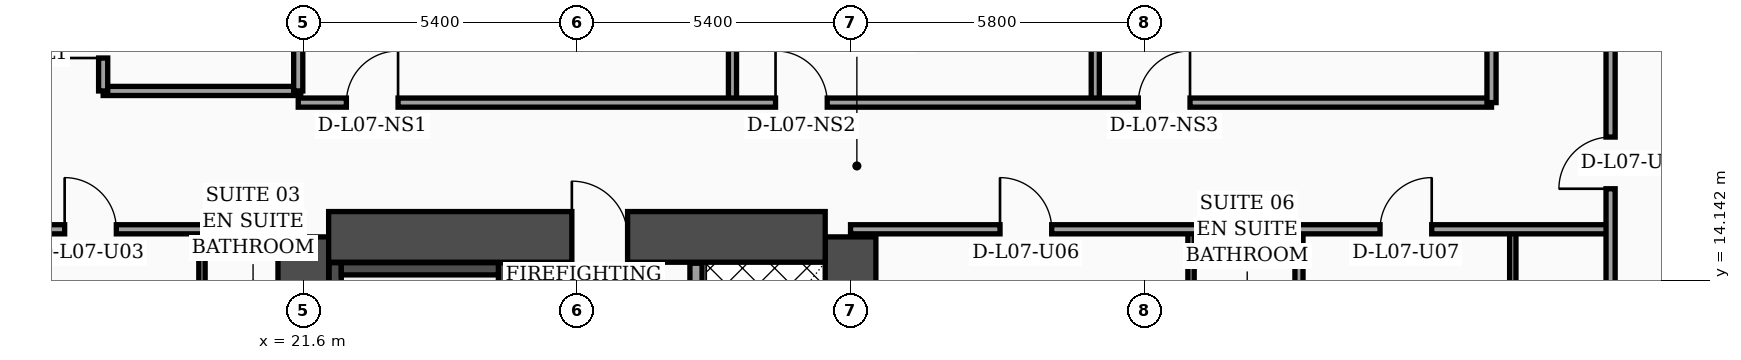
"""IFC4 building model, lengths in metres.
Left out: names, types, materials, properties, quantities, classifications, styles, units other than length and angle.
Written with IfcOpenShell. Run it as: python <this file> out.ifc"""

import sys

from ifc_helpers import new_model, si_unit, direction, frame, frame_2d, origin, place, context, subcontext, project, spatial, rectangle, extrude, element, fill, save


model = new_model("IFC4")
c1 = context("Model", 3, precision=1e-05, world=origin(), true_north=direction((0.0, 1.0)))
c2 = subcontext(c1, "Body", "Model", "MODEL_VIEW")
j1 = project(units=[si_unit("LENGTHUNIT", "METRE"), si_unit("PLANEANGLEUNIT", "RADIAN")], contexts=[c1])
p1 = place(None, origin())
s1 = spatial("IfcSite", under=j1, at=p1, CompositionType="ELEMENT")
p2 = place(p1, origin())
s2 = spatial("IfcBuilding", under=s1, at=p2, CompositionType="ELEMENT")
p3 = place(p2, frame((0.0, 0.0, 34.6)))
s3 = spatial("IfcBuildingStorey", under=s2, at=p3, CompositionType="ELEMENT", Elevation=34.6)
for number, where, z_axis, x_axis in (
    (1, (21.6, 4.6, 0.0), (0.0, 0.0, 1.0), (0.0, 1.0, 0.0)),
    (2, (32.4, 4.6, 0.0), (0.0, 0.0, 1.0), (0.0, 1.0, 0.0)),
):
    element("IfcWall", number, at=place(p3, frame(where, z_axis=z_axis, x_axis=x_axis)), inside=s3, PredefinedType="SHEAR", context=c2, shape_type="SweptSolid", body=[
        extrude(rectangle(XDim=10.4, YDim=1.0, at=frame_2d((5.2, 0.0))), origin(), (0.0, 0.0, 1.0), 3.56),
    ])
p4 = place(p3, frame((22.1, 15.0, 0.0), z_axis=(0.0, 0.0, 1.0), x_axis=(1.0, 0.0, 0.0)))
e3 = element("IfcWall", 3, at=p4, inside=s3, PredefinedType="SHEAR", context=c2, shape_type="SweptSolid", body=[
    extrude(rectangle(XDim=9.8, YDim=1.0, at=frame_2d((4.9, 0.0))), origin(), (0.0, 0.0, 1.0), 3.56),
])
p5 = place(p4, frame((4.8, 0.0, 0.0)))
e4 = element("IfcOpeningElement", 4, at=p5, cuts=e3, PredefinedType="OPENING", context=c2, shape_type="SweptSolid", body=[
    extrude(rectangle(XDim=1.1, YDim=2.2, at=frame_2d((0.55, 1.1))), frame((0.0, 0.51, 0.0), z_axis=(0.0, -1.0, 0.0), x_axis=(1.0, 0.0, 0.0)), (0.0, 0.0, 1.0), 1.02),
])
p6 = place(p3, frame((22.23, 5.1, 0.0), z_axis=(0.0, 0.0, 1.0), x_axis=(0.0, 1.0, 0.0)))
e5 = element("IfcWall", 5, at=p6, inside=s3, PredefinedType="SOLIDWALL", context=c2, shape_type="SweptSolid", body=[
    extrude(rectangle(XDim=9.39, YDim=0.24, at=frame_2d((4.695, 0.0))), origin(), (0.0, 0.0, 1.0), 3.56),
])
p7 = place(p3, frame((25.57, 5.1, 0.0), z_axis=(0.0, 0.0, 1.0), x_axis=(0.0, 1.0, 0.0)))
e6 = element("IfcWall", 6, at=p7, inside=s3, PredefinedType="SOLIDWALL", context=c2, shape_type="SweptSolid", body=[
    extrude(rectangle(XDim=9.39, YDim=0.24, at=frame_2d((4.695, 0.0))), origin(), (0.0, 0.0, 1.0), 3.56),
])
p8 = place(p7, frame((0.35, 0.0, 0.0)))
e7 = element("IfcOpeningElement", 7, at=p8, cuts=e6, PredefinedType="OPENING", context=c2, shape_type="SweptSolid", body=[
    extrude(rectangle(XDim=1.15, YDim=2.2, at=frame_2d((0.575, 1.1))), frame((0.0, 0.13, 0.0), z_axis=(0.0, -1.0, 0.0), x_axis=(1.0, 0.0, 0.0)), (0.0, 0.0, 1.0), 0.26),
])
p9 = place(p3, frame((22.35, 14.37, 0.0), z_axis=(0.0, 0.0, 1.0), x_axis=(1.0, 0.0, 0.0)))
e8 = element("IfcWall", 8, at=p9, inside=s3, PredefinedType="SOLIDWALL", context=c2, shape_type="SweptSolid", body=[
    extrude(rectangle(XDim=3.1, YDim=0.24, at=frame_2d((1.55, 0.0))), origin(), (0.0, 0.0, 1.0), 3.56),
])
p10 = place(p3, frame((29.35, 5.12, 0.0), z_axis=(0.0, 0.0, 1.0), x_axis=(0.0, 1.0, 0.0)))
e9 = element("IfcWall", 9, at=p10, inside=s3, PredefinedType="SOLIDWALL", context=c2, shape_type="SweptSolid", body=[
    extrude(rectangle(XDim=9.36, YDim=0.24, at=frame_2d((4.68, 0.0))), origin(), (0.0, 0.0, 1.0), 3.56),
])
p11 = place(p10, frame((0.55, 0.0, 0.0)))
e10 = element("IfcOpeningElement", 10, at=p11, cuts=e9, PredefinedType="OPENING", context=c2, shape_type="SweptSolid", body=[
    extrude(rectangle(XDim=1.3, YDim=2.35, at=frame_2d((0.65, 1.175))), frame((0.0, 0.13, 0.0), z_axis=(0.0, -1.0, 0.0), x_axis=(1.0, 0.0, 0.0)), (0.0, 0.0, 1.0), 0.26),
])
p12 = place(p3, frame((19.6, 2.44, 0.0), z_axis=(0.0, 0.0, 1.0), x_axis=(0.0, 1.0, 0.0)))
e11 = element("IfcWall", 11, at=p12, inside=s3, PredefinedType="PARTITIONING", context=c2, shape_type="SweptSolid", body=[
    extrude(rectangle(XDim=12.71, YDim=0.125, at=frame_2d((6.355, 0.0))), origin(), (0.0, 0.0, 1.0), 2.34),
])
p13 = place(p12, frame((4.34, 0.0, 0.0)))
e12 = element("IfcOpeningElement", 12, at=p13, cuts=e11, PredefinedType="OPENING", context=c2, shape_type="SweptSolid", body=[
    extrude(rectangle(XDim=0.96, YDim=2.2, at=frame_2d((0.48, 1.1))), frame((0.0, 0.073, 0.0), z_axis=(0.0, -1.0, 0.0), x_axis=(1.0, 0.0, 0.0)), (0.0, 0.0, 1.0), 0.145),
])
p14 = place(p12, frame((10.18, 0.0, 0.0)))
e13 = element("IfcOpeningElement", 13, at=p14, cuts=e11, PredefinedType="OPENING", context=c2, shape_type="SweptSolid", body=[
    extrude(rectangle(XDim=0.9, YDim=2.15, at=frame_2d((0.45, 1.075))), frame((0.0, 0.073, 0.0), z_axis=(0.0, -1.0, 0.0), x_axis=(1.0, 0.0, 0.0)), (0.0, 0.0, 1.0), 0.145),
])
p15 = place(p3, frame((15.15, 15.15, 0.0), z_axis=(0.0, 0.0, 1.0), x_axis=(1.0, 0.0, 0.0)))
e14 = element("IfcWall", 14, at=p15, inside=s3, PredefinedType="PARTITIONING", context=c2, shape_type="SweptSolid", body=[
    extrude(rectangle(XDim=6.45, YDim=0.18, at=frame_2d((3.225, 0.0))), origin(), (0.0, 0.0, 1.0), 2.34),
])
p16 = place(p15, frame((1.74, 0.0, 0.0)))
e15 = element("IfcOpeningElement", 15, at=p16, cuts=e14, PredefinedType="OPENING", context=c2, shape_type="SweptSolid", body=[
    extrude(rectangle(XDim=1.02, YDim=2.2, at=frame_2d((0.51, 1.1))), frame((0.0, 0.1, 0.0), z_axis=(0.0, -1.0, 0.0), x_axis=(1.0, 0.0, 0.0)), (0.0, 0.0, 1.0), 0.2),
])
p17 = place(p3, frame((17.65, 17.88, 0.0), z_axis=(0.0, 0.0, 1.0), x_axis=(1.0, 0.0, 0.0)))
e16 = element("IfcWall", 16, at=p17, inside=s3, PredefinedType="PARTITIONING", context=c2, shape_type="SweptSolid", body=[
    extrude(rectangle(XDim=3.9, YDim=0.18, at=frame_2d((1.95, 0.0))), origin(), (0.0, 0.0, 1.0), 3.09),
])
p18 = place(p3, frame((21.5, 17.88, 0.0), z_axis=(0.0, 0.0, 1.0), x_axis=(0.0, 1.0, 0.0)))
e17 = element("IfcWall", 17, at=p18, inside=s3, PredefinedType="PARTITIONING", context=c2, shape_type="SweptSolid", body=[
    extrude(rectangle(XDim=6.44, YDim=0.18, at=frame_2d((3.22, 0.0))), origin(), (0.0, 0.0, 1.0), 3.09),
])
p19 = place(p3, frame((17.65, 17.88, 0.0), z_axis=(0.0, 0.0, 1.0), x_axis=(0.0, 1.0, 0.0)))
e18 = element("IfcWall", 18, at=p19, inside=s3, PredefinedType="PARTITIONING", context=c2, shape_type="SweptSolid", body=[
    extrude(rectangle(XDim=6.44, YDim=0.18, at=frame_2d((3.22, 0.0))), origin(), (0.0, 0.0, 1.0), 3.09),
])
p20 = place(p19, frame((0.65, 0.0, 0.0)))
e19 = element("IfcOpeningElement", 19, at=p20, cuts=e18, PredefinedType="OPENING", context=c2, shape_type="SweptSolid", body=[
    extrude(rectangle(XDim=0.98, YDim=2.15, at=frame_2d((0.49, 1.075))), frame((0.0, 0.1, 0.0), z_axis=(0.0, -1.0, 0.0), x_axis=(1.0, 0.0, 0.0)), (0.0, 0.0, 1.0), 0.2),
])
p21 = place(p19, frame((3.97, 0.0, 0.0)))
e20 = element("IfcOpeningElement", 20, at=p21, cuts=e18, PredefinedType="OPENING", context=c2, shape_type="SweptSolid", body=[
    extrude(rectangle(XDim=0.96, YDim=2.2, at=frame_2d((0.48, 1.1))), frame((0.0, 0.1, 0.0), z_axis=(0.0, -1.0, 0.0), x_axis=(1.0, 0.0, 0.0)), (0.0, 0.0, 1.0), 0.2),
])
p22 = place(p3, frame((39.12, 2.44, 0.0), z_axis=(0.0, 0.0, 1.0), x_axis=(0.0, 1.0, 0.0)))
e21 = element("IfcWall", 21, at=p22, inside=s3, PredefinedType="PARTITIONING", context=c2, shape_type="SweptSolid", body=[
    extrude(rectangle(XDim=12.71, YDim=0.125, at=frame_2d((6.355, 0.0))), origin(), (0.0, 0.0, 1.0), 2.84),
])
p23 = place(p22, frame((4.35, 0.0, 0.0)))
e22 = element("IfcOpeningElement", 22, at=p23, cuts=e21, PredefinedType="OPENING", context=c2, shape_type="SweptSolid", body=[
    extrude(rectangle(XDim=0.96, YDim=2.2, at=frame_2d((0.48, 1.1))), frame((0.0, 0.073, 0.0), z_axis=(0.0, -1.0, 0.0), x_axis=(1.0, 0.0, 0.0)), (0.0, 0.0, 1.0), 0.145),
])
p24 = place(p22, frame((10.21, 0.0, 0.0)))
e23 = element("IfcOpeningElement", 23, at=p24, cuts=e21, PredefinedType="OPENING", context=c2, shape_type="SweptSolid", body=[
    extrude(rectangle(XDim=0.9, YDim=2.15, at=frame_2d((0.45, 1.075))), frame((0.0, 0.073, 0.0), z_axis=(0.0, -1.0, 0.0), x_axis=(1.0, 0.0, 0.0)), (0.0, 0.0, 1.0), 0.145),
])
p25 = place(p3, frame((45.47, 2.44, 0.0), z_axis=(0.0, 0.0, 1.0), x_axis=(0.0, 1.0, 0.0)))
e24 = element("IfcWall", 24, at=p25, inside=s3, PredefinedType="PARTITIONING", context=c2, shape_type="SweptSolid", body=[
    extrude(rectangle(XDim=12.71, YDim=0.125, at=frame_2d((6.355, 0.0))), origin(), (0.0, 0.0, 1.0), 3.04),
])
p26 = place(p25, frame((4.35, 0.0, 0.0)))
e25 = element("IfcOpeningElement", 25, at=p26, cuts=e24, PredefinedType="OPENING", context=c2, shape_type="SweptSolid", body=[
    extrude(rectangle(XDim=0.96, YDim=2.2, at=frame_2d((0.48, 1.1))), frame((0.0, 0.073, 0.0), z_axis=(0.0, -1.0, 0.0), x_axis=(1.0, 0.0, 0.0)), (0.0, 0.0, 1.0), 0.145),
])
p27 = place(p25, frame((10.21, 0.0, 0.0)))
e26 = element("IfcOpeningElement", 26, at=p27, cuts=e24, PredefinedType="OPENING", context=c2, shape_type="SweptSolid", body=[
    extrude(rectangle(XDim=0.9, YDim=2.15, at=frame_2d((0.45, 1.075))), frame((0.0, 0.073, 0.0), z_axis=(0.0, -1.0, 0.0), x_axis=(1.0, 0.0, 0.0)), (0.0, 0.0, 1.0), 0.145),
])
p28 = place(p3, frame((41.25, 2.44, 0.0), z_axis=(0.0, 0.0, 1.0), x_axis=(0.0, 1.0, 0.0)))
e27 = element("IfcWall", 27, at=p28, inside=s3, PredefinedType="PARTITIONING", context=c2, shape_type="SweptSolid", body=[
    extrude(rectangle(XDim=12.71, YDim=0.16, at=frame_2d((6.355, 0.0))), origin(), (0.0, 0.0, 1.0), 3.04),
])
p29 = place(p3, frame((32.4, 15.15, 0.0), z_axis=(0.0, 0.0, 1.0), x_axis=(1.0, 0.0, 0.0)))
e28 = element("IfcWall", 28, at=p29, inside=s3, PredefinedType="PARTITIONING", context=c2, shape_type="SweptSolid", body=[
    extrude(rectangle(XDim=15.0, YDim=0.18, at=frame_2d((7.5, 0.0))), origin(), (0.0, 0.0, 1.0), 2.84),
])
p30 = place(p29, frame((2.95, 0.0, 0.0)))
e29 = element("IfcOpeningElement", 29, at=p30, cuts=e28, PredefinedType="OPENING", context=c2, shape_type="SweptSolid", body=[
    extrude(rectangle(XDim=1.02, YDim=2.2, at=frame_2d((0.51, 1.1))), frame((0.0, 0.1, 0.0), z_axis=(0.0, -1.0, 0.0), x_axis=(1.0, 0.0, 0.0)), (0.0, 0.0, 1.0), 0.2),
])
p31 = place(p29, frame((10.45, 0.0, 0.0)))
e30 = element("IfcOpeningElement", 30, at=p31, cuts=e28, PredefinedType="OPENING", context=c2, shape_type="SweptSolid", body=[
    extrude(rectangle(XDim=1.02, YDim=2.2, at=frame_2d((0.51, 1.1))), frame((0.0, 0.1, 0.0), z_axis=(0.0, -1.0, 0.0), x_axis=(1.0, 0.0, 0.0)), (0.0, 0.0, 1.0), 0.2),
])
p32 = place(p3, frame((30.07, 17.65, 0.0), z_axis=(0.0, 0.0, 1.0), x_axis=(0.0, 1.0, 0.0)))
e31 = element("IfcWall", 31, at=p32, inside=s3, PredefinedType="PARTITIONING", context=c2, shape_type="SweptSolid", body=[
    extrude(rectangle(XDim=10.83, YDim=0.16, at=frame_2d((5.415, 0.0))), origin(), (0.0, 0.0, 1.0), 2.84),
])
p33 = place(p3, frame((37.23, 17.65, 0.0), z_axis=(0.0, 0.0, 1.0), x_axis=(0.0, 1.0, 0.0)))
e32 = element("IfcWall", 32, at=p33, inside=s3, PredefinedType="PARTITIONING", context=c2, shape_type="SweptSolid", body=[
    extrude(rectangle(XDim=14.21, YDim=0.16, at=frame_2d((7.105, 0.0))), origin(), (0.0, 0.0, 1.0), 2.84),
])
p34 = place(p3, frame((21.5, 17.65, 0.0), z_axis=(0.0, 0.0, 1.0), x_axis=(1.0, 0.0, 0.0)))
e33 = element("IfcWall", 33, at=p34, inside=s3, PredefinedType="PARTITIONING", context=c2, shape_type="SweptSolid", body=[
    extrude(rectangle(XDim=23.55, YDim=0.18, at=frame_2d((11.775, 0.0))), origin(), (0.0, 0.0, 1.0), 2.84),
])
p35 = place(p34, frame((0.95, 0.0, 0.0)))
e34 = element("IfcOpeningElement", 34, at=p35, cuts=e33, PredefinedType="OPENING", context=c2, shape_type="SweptSolid", body=[
    extrude(rectangle(XDim=1.02, YDim=2.2, at=frame_2d((0.51, 1.1))), frame((0.0, 0.1, 0.0), z_axis=(0.0, -1.0, 0.0), x_axis=(1.0, 0.0, 0.0)), (0.0, 0.0, 1.0), 0.2),
])
p36 = place(p34, frame((9.42, 0.0, 0.0)))
e35 = element("IfcOpeningElement", 35, at=p36, cuts=e33, PredefinedType="OPENING", context=c2, shape_type="SweptSolid", body=[
    extrude(rectangle(XDim=1.02, YDim=2.2, at=frame_2d((0.51, 1.1))), frame((0.0, 0.1, 0.0), z_axis=(0.0, -1.0, 0.0), x_axis=(1.0, 0.0, 0.0)), (0.0, 0.0, 1.0), 0.2),
])
p37 = place(p34, frame((16.58, 0.0, 0.0)))
e36 = element("IfcOpeningElement", 36, at=p37, cuts=e33, PredefinedType="OPENING", context=c2, shape_type="SweptSolid", body=[
    extrude(rectangle(XDim=1.02, YDim=2.2, at=frame_2d((0.51, 1.1))), frame((0.0, 0.1, 0.0), z_axis=(0.0, -1.0, 0.0), x_axis=(1.0, 0.0, 0.0)), (0.0, 0.0, 1.0), 0.2),
])
p38 = place(p3, frame((45.05, 17.65, 0.0), z_axis=(0.0, 0.0, 1.0), x_axis=(0.0, 1.0, 0.0)))
e37 = element("IfcWall", 37, at=p38, inside=s3, PredefinedType="PARTITIONING", context=c2, shape_type="SweptSolid", body=[
    extrude(rectangle(XDim=17.9, YDim=0.18, at=frame_2d((8.95, 0.0))), origin(), (0.0, 0.0, 1.0), 2.84),
])
p39 = place(p3, frame((47.4, 2.44, 0.0), z_axis=(0.0, 0.0, 1.0), x_axis=(0.0, 1.0, 0.0)))
e38 = element("IfcWall", 38, at=p39, inside=s3, PredefinedType="PARTITIONING", context=c2, shape_type="SweptSolid", body=[
    extrude(rectangle(XDim=27.84, YDim=0.18, at=frame_2d((13.92, 0.0))), origin(), (0.0, 0.0, 1.0), 2.84),
])
p40 = place(p39, frame((13.51, 0.0, 0.0)))
e39 = element("IfcOpeningElement", 39, at=p40, cuts=e38, PredefinedType="OPENING", context=c2, shape_type="SweptSolid", body=[
    extrude(rectangle(XDim=1.02, YDim=2.2, at=frame_2d((0.51, 1.1))), frame((0.0, 0.1, 0.0), z_axis=(0.0, -1.0, 0.0), x_axis=(1.0, 0.0, 0.0)), (0.0, 0.0, 1.0), 0.2),
])
p41 = place(p39, frame((21.52, 0.0, 0.0)))
e40 = element("IfcOpeningElement", 40, at=p41, cuts=e38, PredefinedType="OPENING", context=c2, shape_type="SweptSolid", body=[
    extrude(rectangle(XDim=1.02, YDim=2.2, at=frame_2d((0.51, 1.1))), frame((0.0, 0.1, 0.0), z_axis=(0.0, -1.0, 0.0), x_axis=(1.0, 0.0, 0.0)), (0.0, 0.0, 1.0), 0.2),
])
p42 = place(p16, origin())
e41 = element("IfcDoor", 41, at=p42, inside=s3, OperationType="SINGLE_SWING_LEFT", PredefinedType="DOOR", context=c2, shape_type="SweptSolid", body=[
    extrude(rectangle(XDim=1.02, YDim=2.2, at=frame_2d((0.51, 1.1))), frame((0.0, 0.025, 0.0), z_axis=(0.0, -1.0, 0.0), x_axis=(1.0, 0.0, 0.0)), (0.0, 0.0, 1.0), 0.05),
])
fill(e15, e41)
p43 = place(p20, origin())
e42 = element("IfcDoor", 42, at=p43, inside=s3, OperationType="SINGLE_SWING_LEFT", PredefinedType="DOOR", context=c2, shape_type="SweptSolid", body=[
    extrude(rectangle(XDim=0.98, YDim=2.15, at=frame_2d((0.49, 1.075))), frame((0.0, 0.025, 0.0), z_axis=(0.0, -1.0, 0.0), x_axis=(1.0, 0.0, 0.0)), (0.0, 0.0, 1.0), 0.05),
])
fill(e19, e42)
p44 = place(p30, origin())
e43 = element("IfcDoor", 43, at=p44, inside=s3, OperationType="SINGLE_SWING_LEFT", PredefinedType="DOOR", context=c2, shape_type="SweptSolid", body=[
    extrude(rectangle(XDim=1.02, YDim=2.2, at=frame_2d((0.51, 1.1))), frame((0.0, 0.025, 0.0), z_axis=(0.0, -1.0, 0.0), x_axis=(1.0, 0.0, 0.0)), (0.0, 0.0, 1.0), 0.05),
])
fill(e29, e43)
p45 = place(p31, origin())
e44 = element("IfcDoor", 44, at=p45, inside=s3, OperationType="SINGLE_SWING_RIGHT", PredefinedType="DOOR", context=c2, shape_type="SweptSolid", body=[
    extrude(rectangle(XDim=1.02, YDim=2.2, at=frame_2d((0.51, 1.1))), frame((0.0, 0.025, 0.0), z_axis=(0.0, -1.0, 0.0), x_axis=(1.0, 0.0, 0.0)), (0.0, 0.0, 1.0), 0.05),
])
fill(e30, e44)
p46 = place(p35, origin())
e45 = element("IfcDoor", 45, at=p46, inside=s3, OperationType="SINGLE_SWING_RIGHT", PredefinedType="DOOR", context=c2, shape_type="SweptSolid", body=[
    extrude(rectangle(XDim=1.02, YDim=2.2, at=frame_2d((0.51, 1.1))), frame((0.0, 0.025, 0.0), z_axis=(0.0, -1.0, 0.0), x_axis=(1.0, 0.0, 0.0)), (0.0, 0.0, 1.0), 0.05),
])
fill(e34, e45)
p47 = place(p36, origin())
e46 = element("IfcDoor", 46, at=p47, inside=s3, OperationType="SINGLE_SWING_LEFT", PredefinedType="DOOR", context=c2, shape_type="SweptSolid", body=[
    extrude(rectangle(XDim=1.02, YDim=2.2, at=frame_2d((0.51, 1.1))), frame((0.0, 0.025, 0.0), z_axis=(0.0, -1.0, 0.0), x_axis=(1.0, 0.0, 0.0)), (0.0, 0.0, 1.0), 0.05),
])
fill(e35, e46)
p48 = place(p37, origin())
e47 = element("IfcDoor", 47, at=p48, inside=s3, OperationType="SINGLE_SWING_RIGHT", PredefinedType="DOOR", context=c2, shape_type="SweptSolid", body=[
    extrude(rectangle(XDim=1.02, YDim=2.2, at=frame_2d((0.51, 1.1))), frame((0.0, 0.025, 0.0), z_axis=(0.0, -1.0, 0.0), x_axis=(1.0, 0.0, 0.0)), (0.0, 0.0, 1.0), 0.05),
])
fill(e36, e47)
p49 = place(p40, origin())
e48 = element("IfcDoor", 48, at=p49, inside=s3, OperationType="SINGLE_SWING_LEFT", PredefinedType="DOOR", context=c2, shape_type="SweptSolid", body=[
    extrude(rectangle(XDim=1.02, YDim=2.2, at=frame_2d((0.51, 1.1))), frame((0.0, 0.025, 0.0), z_axis=(0.0, -1.0, 0.0), x_axis=(1.0, 0.0, 0.0)), (0.0, 0.0, 1.0), 0.05),
])
fill(e39, e48)
p50 = place(p5, origin())
e49 = element("IfcDoor", 49, at=p50, inside=s3, OperationType="SINGLE_SWING_LEFT", PredefinedType="DOOR", context=c2, shape_type="SweptSolid", body=[
    extrude(rectangle(XDim=1.1, YDim=2.2, at=frame_2d((0.55, 1.1))), frame((0.0, 0.025, 0.0), z_axis=(0.0, -1.0, 0.0), x_axis=(1.0, 0.0, 0.0)), (0.0, 0.0, 1.0), 0.05),
])
fill(e4, e49)
save(model, sys.argv[1])
